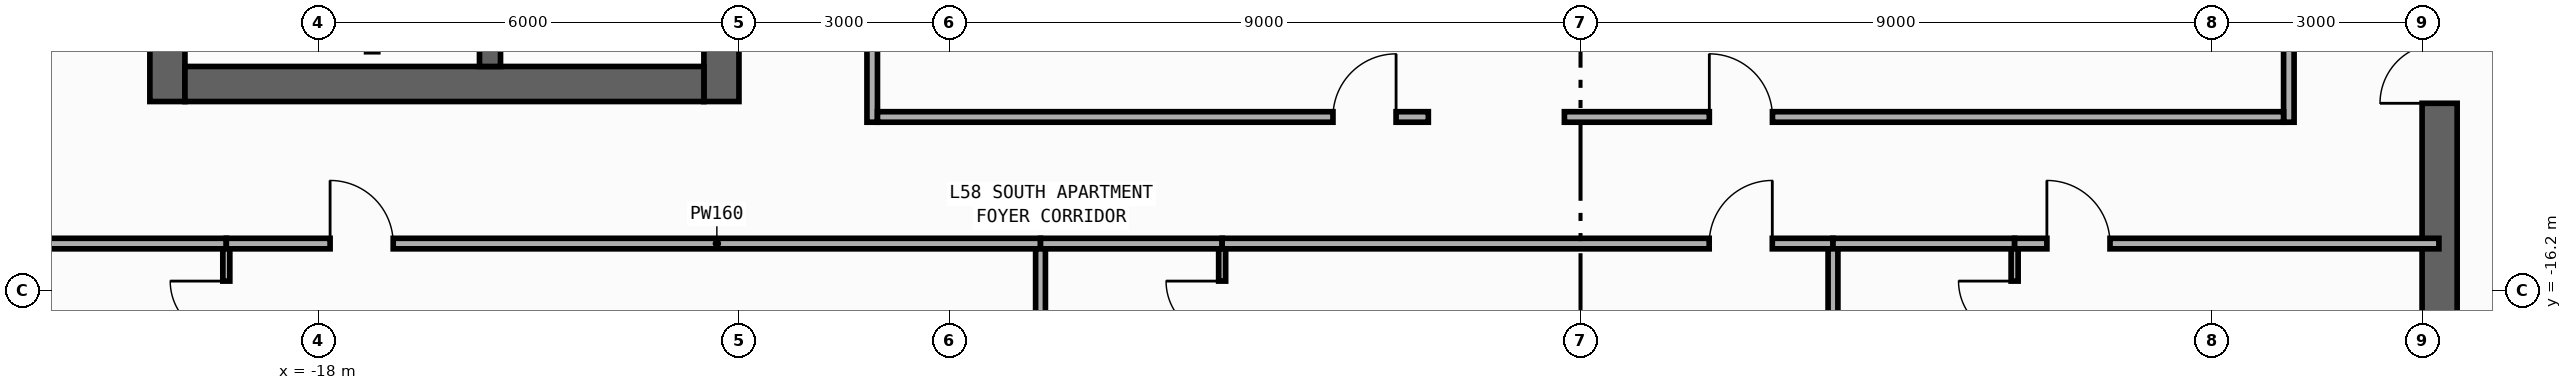
"""IFC4 building model, lengths in metres.
Left out: names, types, materials, properties, quantities, classifications, styles, units other than length and angle.
Written with IfcOpenShell. Run it as: python <this file> out.ifc"""

import sys

from ifc_helpers import new_model, si_unit, direction, frame, frame_2d, origin, place, context, subcontext, project, spatial, rectangle, extrude, element, fill, save


model = new_model("IFC4")
c1 = context("Model", 3, precision=1e-05, world=origin(), true_north=direction((0.0, 1.0)))
c2 = subcontext(c1, "Body", "Model", "MODEL_VIEW")
j1 = project(units=[si_unit("LENGTHUNIT", "METRE"), si_unit("PLANEANGLEUNIT", "RADIAN")], contexts=[c1])
p1 = place(None, origin())
s1 = spatial("IfcSite", under=j1, at=p1, CompositionType="ELEMENT")
p2 = place(p1, origin())
s2 = spatial("IfcBuilding", under=s1, at=p2, CompositionType="ELEMENT")
p3 = place(p2, frame((0.0, 0.0, 247.6)))
s3 = spatial("IfcBuildingStorey", under=s2, at=p3, CompositionType="ELEMENT", Elevation=247.6)
p4 = place(p3, frame((-20.15, -13.5, 0.0), z_axis=(0.0, 0.0, 1.0), x_axis=(0.0, 1.0, 0.0)))
e1 = element("IfcWall", 1, at=p4, inside=s3, PredefinedType="SHEAR", context=c2, shape_type="SweptSolid", body=[
    extrude(rectangle(XDim=27.0, YDim=0.5, at=frame_2d((13.5, 0.0))), origin(), (0.0, 0.0, 1.0), 3.34),
])
p5 = place(p3, frame((-12.25, -13.5, 0.0), z_axis=(0.0, 0.0, 1.0), x_axis=(0.0, 1.0, 0.0)))
e2 = element("IfcWall", 2, at=p5, inside=s3, PredefinedType="SHEAR", context=c2, shape_type="SweptSolid", body=[
    extrude(rectangle(XDim=27.0, YDim=0.5, at=frame_2d((13.5, 0.0))), origin(), (0.0, 0.0, 1.0), 3.34),
])
p6 = place(p5, frame((15.175, 0.0, 0.0)))
e3 = element("IfcOpeningElement", 3, at=p6, cuts=e2, PredefinedType="OPENING", context=c2, shape_type="SweptSolid", body=[
    extrude(rectangle(XDim=0.85, YDim=2.1, at=frame_2d((0.425, 1.05))), frame((0.0, 0.26, 0.0), z_axis=(0.0, -1.0, 0.0), x_axis=(1.0, 0.0, 0.0)), (0.0, 0.0, 1.0), 0.52),
])
p7 = place(p5, frame((21.275, 0.0, 0.0)))
e4 = element("IfcOpeningElement", 4, at=p7, cuts=e2, PredefinedType="OPENING", context=c2, shape_type="SweptSolid", body=[
    extrude(rectangle(XDim=0.85, YDim=2.1, at=frame_2d((0.425, 1.05))), frame((0.0, 0.26, 0.0), z_axis=(0.0, -1.0, 0.0), x_axis=(1.0, 0.0, 0.0)), (0.0, 0.0, 1.0), 0.52),
])
p8 = place(p5, frame((4.275, 0.0, 0.0)))
e5 = element("IfcOpeningElement", 5, at=p8, cuts=e2, PredefinedType="OPENING", context=c2, shape_type="SweptSolid", body=[
    extrude(rectangle(XDim=0.85, YDim=2.1, at=frame_2d((0.425, 1.05))), frame((0.0, 0.26, 0.0), z_axis=(0.0, -1.0, 0.0), x_axis=(1.0, 0.0, 0.0)), (0.0, 0.0, 1.0), 0.52),
])
p9 = place(p5, frame((10.275, 0.0, 0.0)))
e6 = element("IfcOpeningElement", 6, at=p9, cuts=e2, PredefinedType="OPENING", context=c2, shape_type="SweptSolid", body=[
    extrude(rectangle(XDim=0.85, YDim=2.1, at=frame_2d((0.425, 1.05))), frame((0.0, 0.26, 0.0), z_axis=(0.0, -1.0, 0.0), x_axis=(1.0, 0.0, 0.0)), (0.0, 0.0, 1.0), 0.52),
])
p10 = place(p5, frame((12.725, 0.0, 0.0)))
e7 = element("IfcOpeningElement", 7, at=p10, cuts=e2, PredefinedType="OPENING", context=c2, shape_type="SweptSolid", body=[
    extrude(rectangle(XDim=1.15, YDim=2.2, at=frame_2d((0.575, 1.1))), frame((0.0, 0.26, 0.0), z_axis=(0.0, -1.0, 0.0), x_axis=(1.0, 0.0, 0.0)), (0.0, 0.0, 1.0), 0.52),
])
p11 = place(p5, frame((1.625, 0.0, 0.0)))
e8 = element("IfcOpeningElement", 8, at=p11, cuts=e2, PredefinedType="OPENING", context=c2, shape_type="SweptSolid", body=[
    extrude(rectangle(XDim=0.85, YDim=2.1, at=frame_2d((0.425, 1.05))), frame((0.0, 0.26, 0.0), z_axis=(0.0, -1.0, 0.0), x_axis=(1.0, 0.0, 0.0)), (0.0, 0.0, 1.0), 0.52),
])
p12 = place(p3, frame((-19.9, -13.25, 0.0), z_axis=(0.0, 0.0, 1.0), x_axis=(1.0, 0.0, 0.0)))
e9 = element("IfcWall", 9, at=p12, inside=s3, PredefinedType="SHEAR", context=c2, shape_type="SweptSolid", body=[
    extrude(rectangle(XDim=7.4, YDim=0.5, at=frame_2d((3.7, 0.0))), origin(), (0.0, 0.0, 1.0), 3.34),
])
p13 = place(p3, frame((-15.55, -13.0, 0.0), z_axis=(0.0, 0.0, 1.0), x_axis=(0.0, 1.0, 0.0)))
e10 = element("IfcWall", 10, at=p13, inside=s3, PredefinedType="SHEAR", context=c2, shape_type="SweptSolid", body=[
    extrude(rectangle(XDim=26.0, YDim=0.3, at=frame_2d((13.0, 0.0))), origin(), (0.0, 0.0, 1.0), 3.34),
])
p14 = place(p13, frame((12.225, 0.0, 0.0)))
e11 = element("IfcOpeningElement", 11, at=p14, cuts=e10, PredefinedType="OPENING", context=c2, shape_type="SweptSolid", body=[
    extrude(rectangle(XDim=1.15, YDim=2.2, at=frame_2d((0.575, 1.1))), frame((0.0, 0.16, 0.0), z_axis=(0.0, -1.0, 0.0), x_axis=(1.0, 0.0, 0.0)), (0.0, 0.0, 1.0), 0.32),
])
p15 = place(p13, frame((1.125, 0.0, 0.0)))
e12 = element("IfcOpeningElement", 12, at=p15, cuts=e10, PredefinedType="OPENING", context=c2, shape_type="SweptSolid", body=[
    extrude(rectangle(XDim=0.85, YDim=2.1, at=frame_2d((0.425, 1.05))), frame((0.0, 0.16, 0.0), z_axis=(0.0, -1.0, 0.0), x_axis=(1.0, 0.0, 0.0)), (0.0, 0.0, 1.0), 0.32),
])
p16 = place(p3, frame((12.25, -19.8, 0.0), z_axis=(0.0, 0.0, 1.0), x_axis=(0.0, 1.0, 0.0)))
e13 = element("IfcWall", 13, at=p16, inside=s3, PredefinedType="SHEAR", context=c2, shape_type="SweptSolid", body=[
    extrude(rectangle(XDim=27.0, YDim=0.5, at=frame_2d((13.5, 0.0))), origin(), (0.0, 0.0, 1.0), 3.34),
])
p17 = place(p16, frame((23.05, 0.0, 0.0)))
e14 = element("IfcOpeningElement", 14, at=p17, cuts=e13, PredefinedType="OPENING", context=c2, shape_type="SweptSolid", body=[
    extrude(rectangle(XDim=1.1, YDim=2.2, at=frame_2d((0.55, 1.1))), frame((0.0, 0.26, 0.0), z_axis=(0.0, -1.0, 0.0), x_axis=(1.0, 0.0, 0.0)), (0.0, 0.0, 1.0), 0.52),
])
p18 = place(p16, frame((19.85, 0.0, 0.0)))
e15 = element("IfcOpeningElement", 15, at=p18, cuts=e13, PredefinedType="OPENING", context=c2, shape_type="SweptSolid", body=[
    extrude(rectangle(XDim=1.1, YDim=2.2, at=frame_2d((0.55, 1.1))), frame((0.0, 0.26, 0.0), z_axis=(0.0, -1.0, 0.0), x_axis=(1.0, 0.0, 0.0)), (0.0, 0.0, 1.0), 0.52),
])
p19 = place(p16, frame((16.65, 0.0, 0.0)))
e16 = element("IfcOpeningElement", 16, at=p19, cuts=e13, PredefinedType="OPENING", context=c2, shape_type="SweptSolid", body=[
    extrude(rectangle(XDim=1.1, YDim=2.2, at=frame_2d((0.55, 1.1))), frame((0.0, 0.26, 0.0), z_axis=(0.0, -1.0, 0.0), x_axis=(1.0, 0.0, 0.0)), (0.0, 0.0, 1.0), 0.52),
])
p20 = place(p16, frame((6.275, 0.0, 0.0)))
e17 = element("IfcOpeningElement", 17, at=p20, cuts=e13, PredefinedType="OPENING", context=c2, shape_type="SweptSolid", body=[
    extrude(rectangle(XDim=0.85, YDim=2.1, at=frame_2d((0.425, 1.05))), frame((0.0, 0.26, 0.0), z_axis=(0.0, -1.0, 0.0), x_axis=(1.0, 0.0, 0.0)), (0.0, 0.0, 1.0), 0.52),
])
p21 = place(p16, frame((8.575, 0.0, 0.0)))
e18 = element("IfcOpeningElement", 18, at=p21, cuts=e13, PredefinedType="OPENING", context=c2, shape_type="SweptSolid", body=[
    extrude(rectangle(XDim=0.85, YDim=2.1, at=frame_2d((0.425, 1.05))), frame((0.0, 0.26, 0.0), z_axis=(0.0, -1.0, 0.0), x_axis=(1.0, 0.0, 0.0)), (0.0, 0.0, 1.0), 0.52),
])
p22 = place(p16, frame((10.675, 0.0, 0.0)))
e19 = element("IfcOpeningElement", 19, at=p22, cuts=e13, PredefinedType="OPENING", context=c2, shape_type="SweptSolid", body=[
    extrude(rectangle(XDim=0.85, YDim=2.1, at=frame_2d((0.425, 1.05))), frame((0.0, 0.26, 0.0), z_axis=(0.0, -1.0, 0.0), x_axis=(1.0, 0.0, 0.0)), (0.0, 0.0, 1.0), 0.52),
])
p23 = place(p16, frame((12.725, 0.0, 0.0)))
e20 = element("IfcOpeningElement", 20, at=p23, cuts=e13, PredefinedType="OPENING", context=c2, shape_type="SweptSolid", body=[
    extrude(rectangle(XDim=1.15, YDim=2.2, at=frame_2d((0.575, 1.1))), frame((0.0, 0.26, 0.0), z_axis=(0.0, -1.0, 0.0), x_axis=(1.0, 0.0, 0.0)), (0.0, 0.0, 1.0), 0.52),
])
p24 = place(p16, frame((25.125, 0.0, 0.0)))
e21 = element("IfcOpeningElement", 21, at=p24, cuts=e13, PredefinedType="OPENING", context=c2, shape_type="SweptSolid", body=[
    extrude(rectangle(XDim=0.85, YDim=2.1, at=frame_2d((0.425, 1.05))), frame((0.0, 0.26, 0.0), z_axis=(0.0, -1.0, 0.0), x_axis=(1.0, 0.0, 0.0)), (0.0, 0.0, 1.0), 0.52),
])
p25 = place(p3, frame((-10.1, -13.795, 0.0), z_axis=(0.0, 0.0, 1.0), x_axis=(0.0, 1.0, 0.0)))
e22 = element("IfcWall", 22, at=p25, inside=s3, PredefinedType="PARTITIONING", context=c2, shape_type="SweptSolid", body=[
    extrude(rectangle(XDim=11.205, YDim=0.15, at=frame_2d((5.603, 0.0))), origin(), (0.0, 0.0, 1.0), 3.34),
])
p26 = place(p25, frame((8.009, 0.0, 0.0)))
e23 = element("IfcOpeningElement", 23, at=p26, cuts=e22, PredefinedType="OPENING", context=c2, shape_type="SweptSolid", body=[
    extrude(rectangle(XDim=0.9, YDim=2.15, at=frame_2d((0.45, 1.075))), frame((0.0, 0.085, 0.0), z_axis=(0.0, -1.0, 0.0), x_axis=(1.0, 0.0, 0.0)), (0.0, 0.0, 1.0), 0.17),
])
p27 = place(p3, frame((10.1, -13.795, 0.0), z_axis=(0.0, 0.0, 1.0), x_axis=(0.0, 1.0, 0.0)))
e24 = element("IfcWall", 24, at=p27, inside=s3, PredefinedType="PARTITIONING", context=c2, shape_type="SweptSolid", body=[
    extrude(rectangle(XDim=8.575, YDim=0.15, at=frame_2d((4.288, 0.0))), origin(), (0.0, 0.0, 1.0), 3.34),
])
p28 = place(p27, frame((7.215, 0.0, 0.0)))
e25 = element("IfcOpeningElement", 25, at=p28, cuts=e24, PredefinedType="OPENING", context=c2, shape_type="SweptSolid", body=[
    extrude(rectangle(XDim=0.9, YDim=2.15, at=frame_2d((0.45, 1.075))), frame((0.0, 0.085, 0.0), z_axis=(0.0, -1.0, 0.0), x_axis=(1.0, 0.0, 0.0)), (0.0, 0.0, 1.0), 0.17),
])
p29 = place(p3, frame((-21.955, -15.525, 0.0), z_axis=(0.0, 0.0, 1.0), x_axis=(1.0, 0.0, 0.0)))
e26 = element("IfcWall", 26, at=p29, inside=s3, PredefinedType="PARTITIONING", context=c2, shape_type="SweptSolid", body=[
    extrude(rectangle(XDim=2.645, YDim=0.15, at=frame_2d((1.323, 0.0))), origin(), (0.0, 0.0, 1.0), 3.34),
])
p30 = place(p3, frame((-19.31, -15.525, 0.0), z_axis=(0.0, 0.0, 1.0), x_axis=(1.0, 0.0, 0.0)))
e27 = element("IfcWall", 27, at=p30, inside=s3, PredefinedType="PARTITIONING", context=c2, shape_type="SweptSolid", body=[
    extrude(rectangle(XDim=11.61, YDim=0.15, at=frame_2d((5.805, 0.0))), origin(), (0.0, 0.0, 1.0), 3.34),
])
p31 = place(p30, frame((1.48, 0.0, 0.0)))
e28 = element("IfcOpeningElement", 28, at=p31, cuts=e27, PredefinedType="OPENING", context=c2, shape_type="SweptSolid", body=[
    extrude(rectangle(XDim=0.9, YDim=2.15, at=frame_2d((0.45, 1.075))), frame((0.0, 0.085, 0.0), z_axis=(0.0, -1.0, 0.0), x_axis=(1.0, 0.0, 0.0)), (0.0, 0.0, 1.0), 0.17),
])
p32 = place(p3, frame((-7.7, -15.525, 0.0), z_axis=(0.0, 0.0, 1.0), x_axis=(1.0, 0.0, 0.0)))
e29 = element("IfcWall", 29, at=p32, inside=s3, PredefinedType="PARTITIONING", context=c2, shape_type="SweptSolid", body=[
    extrude(rectangle(XDim=2.59, YDim=0.15, at=frame_2d((1.295, 0.0))), origin(), (0.0, 0.0, 1.0), 3.34),
])
p33 = place(p3, frame((-5.11, -15.525, 0.0), z_axis=(0.0, 0.0, 1.0), x_axis=(1.0, 0.0, 0.0)))
e30 = element("IfcWall", 30, at=p33, inside=s3, PredefinedType="PARTITIONING", context=c2, shape_type="SweptSolid", body=[
    extrude(rectangle(XDim=8.71, YDim=0.15, at=frame_2d((4.355, 0.0))), origin(), (0.0, 0.0, 1.0), 3.34),
])
p34 = place(p33, frame((6.945, 0.0, 0.0)))
e31 = element("IfcOpeningElement", 31, at=p34, cuts=e30, PredefinedType="OPENING", context=c2, shape_type="SweptSolid", body=[
    extrude(rectangle(XDim=0.9, YDim=2.15, at=frame_2d((0.45, 1.075))), frame((0.0, 0.085, 0.0), z_axis=(0.0, -1.0, 0.0), x_axis=(1.0, 0.0, 0.0)), (0.0, 0.0, 1.0), 0.17),
])
p35 = place(p3, frame((3.6, -15.525, 0.0), z_axis=(0.0, 0.0, 1.0), x_axis=(1.0, 0.0, 0.0)))
e32 = element("IfcWall", 32, at=p35, inside=s3, PredefinedType="PARTITIONING", context=c2, shape_type="SweptSolid", body=[
    extrude(rectangle(XDim=2.59, YDim=0.15, at=frame_2d((1.295, 0.0))), origin(), (0.0, 0.0, 1.0), 3.34),
])
p36 = place(p3, frame((6.19, -15.525, 0.0), z_axis=(0.0, 0.0, 1.0), x_axis=(1.0, 0.0, 0.0)))
e33 = element("IfcWall", 33, at=p36, inside=s3, PredefinedType="PARTITIONING", context=c2, shape_type="SweptSolid", body=[
    extrude(rectangle(XDim=6.05, YDim=0.15, at=frame_2d((3.025, 0.0))), origin(), (0.0, 0.0, 1.0), 3.34),
])
p37 = place(p36, frame((0.46, 0.0, 0.0)))
e34 = element("IfcOpeningElement", 34, at=p37, cuts=e33, PredefinedType="OPENING", context=c2, shape_type="SweptSolid", body=[
    extrude(rectangle(XDim=0.9, YDim=2.15, at=frame_2d((0.45, 1.075))), frame((0.0, 0.085, 0.0), z_axis=(0.0, -1.0, 0.0), x_axis=(1.0, 0.0, 0.0)), (0.0, 0.0, 1.0), 0.17),
])
p38 = place(p3, frame((-10.025, -13.72, 0.0), z_axis=(0.0, 0.0, 1.0), x_axis=(1.0, 0.0, 0.0)))
e35 = element("IfcWall", 35, at=p38, inside=s3, PredefinedType="PARTITIONING", context=c2, shape_type="SweptSolid", body=[
    extrude(rectangle(XDim=7.855, YDim=0.15, at=frame_2d((3.927, 0.0))), origin(), (0.0, 0.0, 1.0), 3.34),
])
p39 = place(p38, frame((6.495, 0.0, 0.0)))
e36 = element("IfcOpeningElement", 36, at=p39, cuts=e35, PredefinedType="OPENING", context=c2, shape_type="SweptSolid", body=[
    extrude(rectangle(XDim=0.9, YDim=2.15, at=frame_2d((0.45, 1.075))), frame((0.0, 0.085, 0.0), z_axis=(0.0, -1.0, 0.0), x_axis=(1.0, 0.0, 0.0)), (0.0, 0.0, 1.0), 0.17),
])
p40 = place(p3, frame((-0.23, -13.72, 0.0), z_axis=(0.0, 0.0, 1.0), x_axis=(1.0, 0.0, 0.0)))
e37 = element("IfcWall", 37, at=p40, inside=s3, PredefinedType="PARTITIONING", context=c2, shape_type="SweptSolid", body=[
    extrude(rectangle(XDim=10.255, YDim=0.15, at=frame_2d((5.127, 0.0))), origin(), (0.0, 0.0, 1.0), 3.34),
])
p41 = place(p40, frame((2.067, 0.0, 0.0)))
e38 = element("IfcOpeningElement", 38, at=p41, cuts=e37, PredefinedType="OPENING", context=c2, shape_type="SweptSolid", body=[
    extrude(rectangle(XDim=0.9, YDim=2.15, at=frame_2d((0.45, 1.075))), frame((0.0, 0.085, 0.0), z_axis=(0.0, -1.0, 0.0), x_axis=(1.0, 0.0, 0.0)), (0.0, 0.0, 1.0), 0.17),
])
p42 = place(p3, frame((-19.31, -18.1, 0.0), z_axis=(0.0, 0.0, 1.0), x_axis=(0.0, 1.0, 0.0)))
e39 = element("IfcWall", 39, at=p42, inside=s3, PredefinedType="PARTITIONING", context=c2, shape_type="SweptSolid", body=[
    extrude(rectangle(XDim=2.5, YDim=0.1, at=frame_2d((1.25, 0.0))), origin(), (0.0, 0.0, 1.0), 3.34),
])
p43 = place(p42, frame((1.24, 0.0, 0.0)))
e40 = element("IfcOpeningElement", 40, at=p43, cuts=e39, PredefinedType="OPENING", context=c2, shape_type="SweptSolid", body=[
    extrude(rectangle(XDim=0.8, YDim=2.1, at=frame_2d((0.4, 1.05))), frame((0.0, 0.06, 0.0), z_axis=(0.0, -1.0, 0.0), x_axis=(1.0, 0.0, 0.0)), (0.0, 0.0, 1.0), 0.12),
])
p44 = place(p3, frame((-7.7, -18.1, 0.0), z_axis=(0.0, 0.0, 1.0), x_axis=(0.0, 1.0, 0.0)))
e41 = element("IfcWall", 41, at=p44, inside=s3, PredefinedType="PARTITIONING", context=c2, shape_type="SweptSolid", body=[
    extrude(rectangle(XDim=2.5, YDim=0.14, at=frame_2d((1.25, 0.0))), origin(), (0.0, 0.0, 1.0), 3.34),
])
p45 = place(p3, frame((-5.11, -18.1, 0.0), z_axis=(0.0, 0.0, 1.0), x_axis=(0.0, 1.0, 0.0)))
e42 = element("IfcWall", 42, at=p45, inside=s3, PredefinedType="PARTITIONING", context=c2, shape_type="SweptSolid", body=[
    extrude(rectangle(XDim=2.5, YDim=0.1, at=frame_2d((1.25, 0.0))), origin(), (0.0, 0.0, 1.0), 3.34),
])
p46 = place(p45, frame((1.24, 0.0, 0.0)))
e43 = element("IfcOpeningElement", 43, at=p46, cuts=e42, PredefinedType="OPENING", context=c2, shape_type="SweptSolid", body=[
    extrude(rectangle(XDim=0.8, YDim=2.1, at=frame_2d((0.4, 1.05))), frame((0.0, 0.06, 0.0), z_axis=(0.0, -1.0, 0.0), x_axis=(1.0, 0.0, 0.0)), (0.0, 0.0, 1.0), 0.12),
])
p47 = place(p3, frame((3.6, -18.1, 0.0), z_axis=(0.0, 0.0, 1.0), x_axis=(0.0, 1.0, 0.0)))
e44 = element("IfcWall", 44, at=p47, inside=s3, PredefinedType="PARTITIONING", context=c2, shape_type="SweptSolid", body=[
    extrude(rectangle(XDim=2.5, YDim=0.14, at=frame_2d((1.25, 0.0))), origin(), (0.0, 0.0, 1.0), 3.34),
])
p48 = place(p3, frame((6.19, -18.1, 0.0), z_axis=(0.0, 0.0, 1.0), x_axis=(0.0, 1.0, 0.0)))
e45 = element("IfcWall", 45, at=p48, inside=s3, PredefinedType="PARTITIONING", context=c2, shape_type="SweptSolid", body=[
    extrude(rectangle(XDim=2.5, YDim=0.1, at=frame_2d((1.25, 0.0))), origin(), (0.0, 0.0, 1.0), 3.34),
])
p49 = place(p48, frame((1.24, 0.0, 0.0)))
e46 = element("IfcOpeningElement", 46, at=p49, cuts=e45, PredefinedType="OPENING", context=c2, shape_type="SweptSolid", body=[
    extrude(rectangle(XDim=0.8, YDim=2.1, at=frame_2d((0.4, 1.05))), frame((0.0, 0.06, 0.0), z_axis=(0.0, -1.0, 0.0), x_axis=(1.0, 0.0, 0.0)), (0.0, 0.0, 1.0), 0.12),
])
p50 = place(p20, origin())
e47 = element("IfcDoor", 47, at=p50, inside=s3, OperationType="SINGLE_SWING_LEFT", PredefinedType="DOOR", context=c2, shape_type="SweptSolid", body=[
    extrude(rectangle(XDim=0.85, YDim=2.1, at=frame_2d((0.425, 1.05))), frame((0.0, 0.025, 0.0), z_axis=(0.0, -1.0, 0.0), x_axis=(1.0, 0.0, 0.0)), (0.0, 0.0, 1.0), 0.05),
])
fill(e17, e47)
p51 = place(p31, origin())
e48 = element("IfcDoor", 48, at=p51, inside=s3, OperationType="SINGLE_SWING_LEFT", PredefinedType="DOOR", context=c2, shape_type="SweptSolid", body=[
    extrude(rectangle(XDim=0.9, YDim=2.15, at=frame_2d((0.45, 1.075))), frame((0.0, 0.025, 0.0), z_axis=(0.0, -1.0, 0.0), x_axis=(1.0, 0.0, 0.0)), (0.0, 0.0, 1.0), 0.05),
])
fill(e28, e48)
p52 = place(p34, origin())
e49 = element("IfcDoor", 49, at=p52, inside=s3, OperationType="SINGLE_SWING_RIGHT", PredefinedType="DOOR", context=c2, shape_type="SweptSolid", body=[
    extrude(rectangle(XDim=0.9, YDim=2.15, at=frame_2d((0.45, 1.075))), frame((0.0, 0.025, 0.0), z_axis=(0.0, -1.0, 0.0), x_axis=(1.0, 0.0, 0.0)), (0.0, 0.0, 1.0), 0.05),
])
fill(e31, e49)
p53 = place(p37, origin())
e50 = element("IfcDoor", 50, at=p53, inside=s3, OperationType="SINGLE_SWING_LEFT", PredefinedType="DOOR", context=c2, shape_type="SweptSolid", body=[
    extrude(rectangle(XDim=0.9, YDim=2.15, at=frame_2d((0.45, 1.075))), frame((0.0, 0.025, 0.0), z_axis=(0.0, -1.0, 0.0), x_axis=(1.0, 0.0, 0.0)), (0.0, 0.0, 1.0), 0.05),
])
fill(e34, e50)
p54 = place(p39, origin())
e51 = element("IfcDoor", 51, at=p54, inside=s3, OperationType="SINGLE_SWING_RIGHT", PredefinedType="DOOR", context=c2, shape_type="SweptSolid", body=[
    extrude(rectangle(XDim=0.9, YDim=2.15, at=frame_2d((0.45, 1.075))), frame((0.0, 0.025, 0.0), z_axis=(0.0, -1.0, 0.0), x_axis=(1.0, 0.0, 0.0)), (0.0, 0.0, 1.0), 0.05),
])
fill(e36, e51)
p55 = place(p41, origin())
e52 = element("IfcDoor", 52, at=p55, inside=s3, OperationType="SINGLE_SWING_LEFT", PredefinedType="DOOR", context=c2, shape_type="SweptSolid", body=[
    extrude(rectangle(XDim=0.9, YDim=2.15, at=frame_2d((0.45, 1.075))), frame((0.0, 0.025, 0.0), z_axis=(0.0, -1.0, 0.0), x_axis=(1.0, 0.0, 0.0)), (0.0, 0.0, 1.0), 0.05),
])
fill(e38, e52)
p56 = place(p43, origin())
e53 = element("IfcDoor", 53, at=p56, inside=s3, OperationType="SINGLE_SWING_RIGHT", PredefinedType="DOOR", context=c2, shape_type="SweptSolid", body=[
    extrude(rectangle(XDim=0.8, YDim=2.1, at=frame_2d((0.4, 1.05))), frame((0.0, 0.025, 0.0), z_axis=(0.0, -1.0, 0.0), x_axis=(1.0, 0.0, 0.0)), (0.0, 0.0, 1.0), 0.05),
])
fill(e40, e53)
p57 = place(p46, origin())
e54 = element("IfcDoor", 54, at=p57, inside=s3, OperationType="SINGLE_SWING_RIGHT", PredefinedType="DOOR", context=c2, shape_type="SweptSolid", body=[
    extrude(rectangle(XDim=0.8, YDim=2.1, at=frame_2d((0.4, 1.05))), frame((0.0, 0.025, 0.0), z_axis=(0.0, -1.0, 0.0), x_axis=(1.0, 0.0, 0.0)), (0.0, 0.0, 1.0), 0.05),
])
fill(e43, e54)
p58 = place(p49, origin())
e55 = element("IfcDoor", 55, at=p58, inside=s3, OperationType="SINGLE_SWING_RIGHT", PredefinedType="DOOR", context=c2, shape_type="SweptSolid", body=[
    extrude(rectangle(XDim=0.8, YDim=2.1, at=frame_2d((0.4, 1.05))), frame((0.0, 0.025, 0.0), z_axis=(0.0, -1.0, 0.0), x_axis=(1.0, 0.0, 0.0)), (0.0, 0.0, 1.0), 0.05),
])
fill(e46, e55)
save(model, sys.argv[1])
